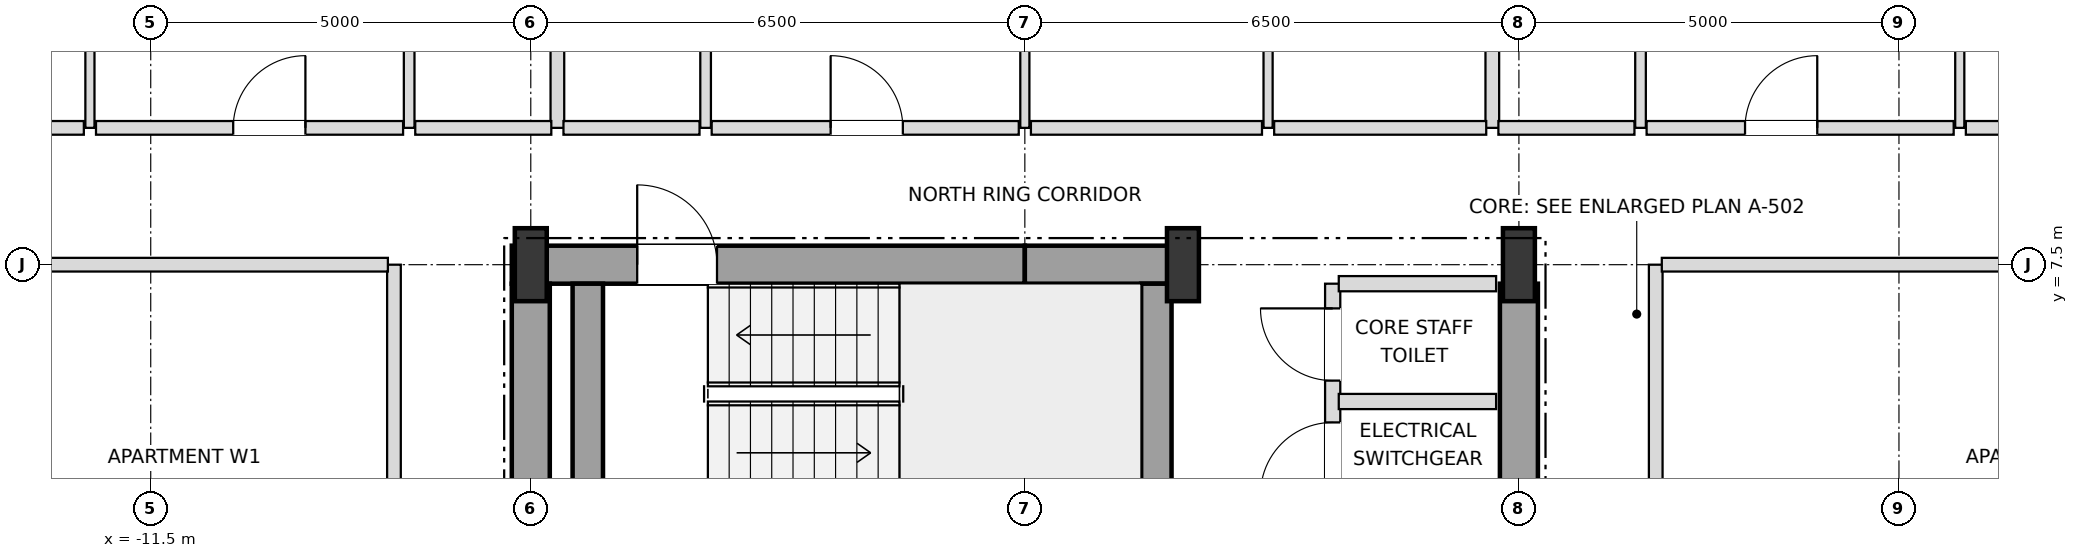
"""IFC4 building model, lengths in metres.
Left out: names, types, materials, properties, quantities, classifications, styles, units other than length and angle.
Written with IfcOpenShell. Run it as: python <this file> out.ifc"""

import sys

from ifc_helpers import new_model, si_unit, direction, frame, frame_2d, origin, origin_2d, place, context, subcontext, project, spatial, rectangle, i_section, extrude, element, fill, save


model = new_model("IFC4")
c1 = context("Model", 3, precision=1e-05, world=origin(), true_north=direction((0.0, 1.0)))
c2 = subcontext(c1, "Body", "Model", "MODEL_VIEW")
j1 = project(units=[si_unit("LENGTHUNIT", "METRE"), si_unit("PLANEANGLEUNIT", "RADIAN")], contexts=[c1])
p1 = place(None, origin())
s1 = spatial("IfcSite", under=j1, at=p1, CompositionType="ELEMENT")
p2 = place(p1, origin())
s2 = spatial("IfcBuilding", under=s1, at=p2, CompositionType="ELEMENT")
p3 = place(p2, frame((0.0, 0.0, 43.2)))
s3 = spatial("IfcBuildingStorey", under=s2, at=p3, CompositionType="ELEMENT", Elevation=43.2)
for number, where, z_axis, x_axis in (
    (1, (-6.5, 7.5, 0.0), (0.0, 0.0, 1.0), (1.0, 0.0, 0.0)),
    (2, (2.08, 7.5, 0.0), (0.0, 0.0, 1.0), (1.0, 0.0, 0.0)),
    (3, (6.5, 7.5, 0.0), (0.0, 0.0, 1.0), (1.0, 0.0, 0.0)),
):
    element("IfcColumn", number, at=place(p3, frame(where, z_axis=z_axis, x_axis=x_axis)), inside=s3, PredefinedType="COLUMN", context=c2, shape_type="SweptSolid", body=[
        extrude(i_section(OverallWidth=0.42, OverallDepth=0.96, WebThickness=0.022, FlangeThickness=0.034, at=origin_2d()), origin(), (0.0, 0.0, 1.0), 3.6),
    ])
p4 = place(p3, frame((-6.75, 7.5, 0.0), z_axis=(0.0, 0.0, 1.0), x_axis=(1.0, 0.0, 0.0)))
e4 = element("IfcWall", 4, at=p4, inside=s3, PredefinedType="SHEAR", context=c2, shape_type="SweptSolid", body=[
    extrude(rectangle(XDim=6.75, YDim=0.5, at=frame_2d((3.375, 0.0))), origin(), (0.0, 0.0, 1.0), 3.38),
])
p5 = place(p4, frame((1.65, 0.0, 0.0)))
e5 = element("IfcOpeningElement", 5, at=p5, cuts=e4, PredefinedType="OPENING", context=c2, shape_type="SweptSolid", body=[
    extrude(rectangle(XDim=1.05, YDim=2.15, at=frame_2d((0.525, 1.075))), frame((0.0, 0.26, 0.0), z_axis=(0.0, -1.0, 0.0), x_axis=(1.0, 0.0, 0.0)), (0.0, 0.0, 1.0), 0.52),
])
p6 = place(p3, frame((0.0, 7.5, 0.0), z_axis=(0.0, 0.0, 1.0), x_axis=(1.0, 0.0, 0.0)))
e6 = element("IfcWall", 6, at=p6, inside=s3, PredefinedType="SHEAR", context=c2, shape_type="SweptSolid", body=[
    extrude(rectangle(XDim=2.08, YDim=0.5, at=frame_2d((1.04, 0.0))), origin(), (0.0, 0.0, 1.0), 3.38),
])
for number, where, z_axis, x_axis in (
    (7, (-6.5, 3.95, 0.0), (0.0, 0.0, 1.0), (0.0, 1.0, 0.0)),
    (8, (6.5, 3.95, 0.0), (0.0, 0.0, 1.0), (0.0, 1.0, 0.0)),
):
    element("IfcWall", number, at=place(p3, frame(where, z_axis=z_axis, x_axis=x_axis)), inside=s3, PredefinedType="SHEAR", context=c2, shape_type="SweptSolid", body=[
        extrude(rectangle(XDim=3.3, YDim=0.5, at=frame_2d((1.65, 0.0))), origin(), (0.0, 0.0, 1.0), 3.38),
    ])
for number, where, z_axis, x_axis in (
    (9, (1.73, 3.95, 0.0), (0.0, 0.0, 1.0), (0.0, 1.0, 0.0)),
    (10, (-5.75, 3.95, 0.0), (0.0, 0.0, 1.0), (0.0, 1.0, 0.0)),
):
    element("IfcWall", number, at=place(p3, frame(where, z_axis=z_axis, x_axis=x_axis)), inside=s3, PredefinedType="SHEAR", context=c2, shape_type="SweptSolid", body=[
        extrude(rectangle(XDim=3.3, YDim=0.4, at=frame_2d((1.65, 0.0))), origin(), (0.0, 0.0, 1.0), 3.38),
    ])
p7 = place(p3, frame((-12.3, 9.3, 0.0), z_axis=(0.0, 0.0, 1.0), x_axis=(0.0, 1.0, 0.0)))
e11 = element("IfcWall", 11, at=p7, inside=s3, PredefinedType="PARTITIONING", context=c2, shape_type="SweptSolid", body=[
    extrude(rectangle(XDim=15.6, YDim=0.12, at=frame_2d((7.8, 0.0))), origin(), (0.0, 0.0, 1.0), 2.736),
])
p8 = place(p7, frame((4.325, 0.0, 0.0)))
e12 = element("IfcOpeningElement", 12, at=p8, cuts=e11, PredefinedType="OPENING", context=c2, shape_type="SweptSolid", body=[
    extrude(rectangle(XDim=0.95, YDim=2.1, at=frame_2d((0.475, 1.05))), frame((0.0, 0.07, 0.0), z_axis=(0.0, -1.0, 0.0), x_axis=(1.0, 0.0, 0.0)), (0.0, 0.0, 1.0), 0.14),
])
p9 = place(p7, frame((12.15, 0.0, 0.0)))
e13 = element("IfcOpeningElement", 13, at=p9, cuts=e11, PredefinedType="OPENING", context=c2, shape_type="SweptSolid", body=[
    extrude(rectangle(XDim=0.9, YDim=2.1, at=frame_2d((0.45, 1.05))), frame((0.0, 0.07, 0.0), z_axis=(0.0, -1.0, 0.0), x_axis=(1.0, 0.0, 0.0)), (0.0, 0.0, 1.0), 0.14),
])
p10 = place(p3, frame((-8.3, -7.5, 0.0), z_axis=(0.0, 0.0, 1.0), x_axis=(0.0, 1.0, 0.0)))
e14 = element("IfcWall", 14, at=p10, inside=s3, PredefinedType="PARTITIONING", context=c2, shape_type="SweptSolid", body=[
    extrude(rectangle(XDim=15.0, YDim=0.18, at=frame_2d((7.5, 0.0))), origin(), (0.0, 0.0, 1.0), 3.38),
])
p11 = place(p10, frame((3.475, 0.0, 0.0)))
e15 = element("IfcOpeningElement", 15, at=p11, cuts=e14, PredefinedType="OPENING", context=c2, shape_type="SweptSolid", body=[
    extrude(rectangle(XDim=0.95, YDim=2.15, at=frame_2d((0.475, 1.075))), frame((0.0, 0.1, 0.0), z_axis=(0.0, -1.0, 0.0), x_axis=(1.0, 0.0, 0.0)), (0.0, 0.0, 1.0), 0.2),
])
p12 = place(p3, frame((-8.1, 9.3, 0.0), z_axis=(0.0, 0.0, 1.0), x_axis=(0.0, 1.0, 0.0)))
e16 = element("IfcWall", 16, at=p12, inside=s3, PredefinedType="PARTITIONING", context=c2, shape_type="SweptSolid", body=[
    extrude(rectangle(XDim=9.6, YDim=0.14, at=frame_2d((4.8, 0.0))), origin(), (0.0, 0.0, 1.0), 2.816),
])
p13 = place(p12, frame((4.35, 0.0, 0.0)))
e17 = element("IfcOpeningElement", 17, at=p13, cuts=e16, PredefinedType="OPENING", context=c2, shape_type="SweptSolid", body=[
    extrude(rectangle(XDim=0.9, YDim=2.1, at=frame_2d((0.45, 1.05))), frame((0.0, 0.08, 0.0), z_axis=(0.0, -1.0, 0.0), x_axis=(1.0, 0.0, 0.0)), (0.0, 0.0, 1.0), 0.16),
])
p14 = place(p3, frame((-6.15, 9.3, 0.0), z_axis=(0.0, 0.0, 1.0), x_axis=(0.0, 1.0, 0.0)))
e18 = element("IfcWall", 18, at=p14, inside=s3, PredefinedType="PARTITIONING", context=c2, shape_type="SweptSolid", body=[
    extrude(rectangle(XDim=15.6, YDim=0.18, at=frame_2d((7.8, 0.0))), origin(), (0.0, 0.0, 1.0), 2.816),
])
p15 = place(p3, frame((-4.2, 9.3, 0.0), z_axis=(0.0, 0.0, 1.0), x_axis=(0.0, 1.0, 0.0)))
e19 = element("IfcWall", 19, at=p15, inside=s3, PredefinedType="PARTITIONING", context=c2, shape_type="SweptSolid", body=[
    extrude(rectangle(XDim=9.6, YDim=0.14, at=frame_2d((4.8, 0.0))), origin(), (0.0, 0.0, 1.0), 2.948),
])
p16 = place(p15, frame((4.35, 0.0, 0.0)))
e20 = element("IfcOpeningElement", 20, at=p16, cuts=e19, PredefinedType="OPENING", context=c2, shape_type="SweptSolid", body=[
    extrude(rectangle(XDim=0.9, YDim=2.1, at=frame_2d((0.45, 1.05))), frame((0.0, 0.08, 0.0), z_axis=(0.0, -1.0, 0.0), x_axis=(1.0, 0.0, 0.0)), (0.0, 0.0, 1.0), 0.16),
])
p17 = place(p3, frame((0.0, 9.3, 0.0), z_axis=(0.0, 0.0, 1.0), x_axis=(0.0, 1.0, 0.0)))
e21 = element("IfcWall", 21, at=p17, inside=s3, PredefinedType="PARTITIONING", context=c2, shape_type="SweptSolid", body=[
    extrude(rectangle(XDim=15.6, YDim=0.12, at=frame_2d((7.8, 0.0))), origin(), (0.0, 0.0, 1.0), 2.816),
])
p18 = place(p17, frame((4.325, 0.0, 0.0)))
e22 = element("IfcOpeningElement", 22, at=p18, cuts=e21, PredefinedType="OPENING", context=c2, shape_type="SweptSolid", body=[
    extrude(rectangle(XDim=0.95, YDim=2.1, at=frame_2d((0.475, 1.05))), frame((0.0, 0.07, 0.0), z_axis=(0.0, -1.0, 0.0), x_axis=(1.0, 0.0, 0.0)), (0.0, 0.0, 1.0), 0.14),
])
p19 = place(p17, frame((12.15, 0.0, 0.0)))
e23 = element("IfcOpeningElement", 23, at=p19, cuts=e21, PredefinedType="OPENING", context=c2, shape_type="SweptSolid", body=[
    extrude(rectangle(XDim=0.9, YDim=2.1, at=frame_2d((0.45, 1.05))), frame((0.0, 0.07, 0.0), z_axis=(0.0, -1.0, 0.0), x_axis=(1.0, 0.0, 0.0)), (0.0, 0.0, 1.0), 0.14),
])
p20 = place(p3, frame((3.2, 9.3, 0.0), z_axis=(0.0, 0.0, 1.0), x_axis=(0.0, 1.0, 0.0)))
e24 = element("IfcWall", 24, at=p20, inside=s3, PredefinedType="PARTITIONING", context=c2, shape_type="SweptSolid", body=[
    extrude(rectangle(XDim=15.6, YDim=0.12, at=frame_2d((7.8, 0.0))), origin(), (0.0, 0.0, 1.0), 2.816),
])
p21 = place(p20, frame((4.35, 0.0, 0.0)))
e25 = element("IfcOpeningElement", 25, at=p21, cuts=e24, PredefinedType="OPENING", context=c2, shape_type="SweptSolid", body=[
    extrude(rectangle(XDim=0.9, YDim=2.1, at=frame_2d((0.45, 1.05))), frame((0.0, 0.07, 0.0), z_axis=(0.0, -1.0, 0.0), x_axis=(1.0, 0.0, 0.0)), (0.0, 0.0, 1.0), 0.14),
])
p22 = place(p20, frame((12.15, 0.0, 0.0)))
e26 = element("IfcOpeningElement", 26, at=p22, cuts=e24, PredefinedType="OPENING", context=c2, shape_type="SweptSolid", body=[
    extrude(rectangle(XDim=0.9, YDim=2.1, at=frame_2d((0.45, 1.05))), frame((0.0, 0.07, 0.0), z_axis=(0.0, -1.0, 0.0), x_axis=(1.0, 0.0, 0.0)), (0.0, 0.0, 1.0), 0.14),
])
p23 = place(p3, frame((4.05, 4.2, 0.0), z_axis=(0.0, 0.0, 1.0), x_axis=(0.0, 1.0, 0.0)))
e27 = element("IfcWall", 27, at=p23, inside=s3, PredefinedType="SOLIDWALL", context=c2, shape_type="SweptSolid", body=[
    extrude(rectangle(XDim=3.05, YDim=0.2, at=frame_2d((1.525, 0.0))), origin(), (0.0, 0.0, 1.0), 3.38),
])
p24 = place(p23, frame((0.275, 0.0, 0.0)))
e28 = element("IfcOpeningElement", 28, at=p24, cuts=e27, PredefinedType="OPENING", context=c2, shape_type="SweptSolid", body=[
    extrude(rectangle(XDim=0.95, YDim=2.15, at=frame_2d((0.475, 1.075))), frame((0.0, 0.11, 0.0), z_axis=(0.0, -1.0, 0.0), x_axis=(1.0, 0.0, 0.0)), (0.0, 0.0, 1.0), 0.22),
])
p25 = place(p23, frame((1.775, 0.0, 0.0)))
e29 = element("IfcOpeningElement", 29, at=p25, cuts=e27, PredefinedType="OPENING", context=c2, shape_type="SweptSolid", body=[
    extrude(rectangle(XDim=0.95, YDim=2.15, at=frame_2d((0.475, 1.075))), frame((0.0, 0.11, 0.0), z_axis=(0.0, -1.0, 0.0), x_axis=(1.0, 0.0, 0.0)), (0.0, 0.0, 1.0), 0.22),
])
p26 = place(p3, frame((6.15, 9.3, 0.0), z_axis=(0.0, 0.0, 1.0), x_axis=(0.0, 1.0, 0.0)))
e30 = element("IfcWall", 30, at=p26, inside=s3, PredefinedType="PARTITIONING", context=c2, shape_type="SweptSolid", body=[
    extrude(rectangle(XDim=15.6, YDim=0.18, at=frame_2d((7.8, 0.0))), origin(), (0.0, 0.0, 1.0), 2.816),
])
p27 = place(p3, frame((8.1, 9.3, 0.0), z_axis=(0.0, 0.0, 1.0), x_axis=(0.0, 1.0, 0.0)))
e31 = element("IfcWall", 31, at=p27, inside=s3, PredefinedType="PARTITIONING", context=c2, shape_type="SweptSolid", body=[
    extrude(rectangle(XDim=9.6, YDim=0.14, at=frame_2d((4.8, 0.0))), origin(), (0.0, 0.0, 1.0), 2.816),
])
p28 = place(p27, frame((4.35, 0.0, 0.0)))
e32 = element("IfcOpeningElement", 32, at=p28, cuts=e31, PredefinedType="OPENING", context=c2, shape_type="SweptSolid", body=[
    extrude(rectangle(XDim=0.9, YDim=2.1, at=frame_2d((0.45, 1.05))), frame((0.0, 0.08, 0.0), z_axis=(0.0, -1.0, 0.0), x_axis=(1.0, 0.0, 0.0)), (0.0, 0.0, 1.0), 0.16),
])
p29 = place(p3, frame((8.3, -7.5, 0.0), z_axis=(0.0, 0.0, 1.0), x_axis=(0.0, 1.0, 0.0)))
e33 = element("IfcWall", 33, at=p29, inside=s3, PredefinedType="PARTITIONING", context=c2, shape_type="SweptSolid", body=[
    extrude(rectangle(XDim=15.0, YDim=0.18, at=frame_2d((7.5, 0.0))), origin(), (0.0, 0.0, 1.0), 3.38),
])
p30 = place(p29, frame((3.475, 0.0, 0.0)))
e34 = element("IfcOpeningElement", 34, at=p30, cuts=e33, PredefinedType="OPENING", context=c2, shape_type="SweptSolid", body=[
    extrude(rectangle(XDim=0.95, YDim=2.15, at=frame_2d((0.475, 1.075))), frame((0.0, 0.1, 0.0), z_axis=(0.0, -1.0, 0.0), x_axis=(1.0, 0.0, 0.0)), (0.0, 0.0, 1.0), 0.2),
])
p31 = place(p3, frame((12.3, 9.3, 0.0), z_axis=(0.0, 0.0, 1.0), x_axis=(0.0, 1.0, 0.0)))
e35 = element("IfcWall", 35, at=p31, inside=s3, PredefinedType="PARTITIONING", context=c2, shape_type="SweptSolid", body=[
    extrude(rectangle(XDim=15.6, YDim=0.12, at=frame_2d((7.8, 0.0))), origin(), (0.0, 0.0, 1.0), 2.736),
])
p32 = place(p31, frame((4.325, 0.0, 0.0)))
e36 = element("IfcOpeningElement", 36, at=p32, cuts=e35, PredefinedType="OPENING", context=c2, shape_type="SweptSolid", body=[
    extrude(rectangle(XDim=0.95, YDim=2.1, at=frame_2d((0.475, 1.05))), frame((0.0, 0.07, 0.0), z_axis=(0.0, -1.0, 0.0), x_axis=(1.0, 0.0, 0.0)), (0.0, 0.0, 1.0), 0.14),
])
p33 = place(p31, frame((12.15, 0.0, 0.0)))
e37 = element("IfcOpeningElement", 37, at=p33, cuts=e35, PredefinedType="OPENING", context=c2, shape_type="SweptSolid", body=[
    extrude(rectangle(XDim=0.9, YDim=2.1, at=frame_2d((0.45, 1.05))), frame((0.0, 0.07, 0.0), z_axis=(0.0, -1.0, 0.0), x_axis=(1.0, 0.0, 0.0)), (0.0, 0.0, 1.0), 0.14),
])
for number, where, z_axis, x_axis in (
    (38, (4.13, 5.7, 0.0), (0.0, 0.0, 1.0), (1.0, 0.0, 0.0)),
    (39, (4.13, 7.25, 0.0), (0.0, 0.0, 1.0), (1.0, 0.0, 0.0)),
):
    element("IfcWall", number, at=place(p3, frame(where, z_axis=z_axis, x_axis=x_axis)), inside=s3, PredefinedType="SOLIDWALL", context=c2, shape_type="SweptSolid", body=[
        extrude(rectangle(XDim=2.07, YDim=0.2, at=frame_2d((1.035, 0.0))), origin(), (0.0, 0.0, 1.0), 3.38),
    ])
for number, where, z_axis, x_axis in (
    (40, (-16.02, 7.5, 0.0), (0.0, 0.0, 1.0), (1.0, 0.0, 0.0)),
    (41, (8.38, 7.5, 0.0), (0.0, 0.0, 1.0), (1.0, 0.0, 0.0)),
):
    element("IfcWall", number, at=place(p3, frame(where, z_axis=z_axis, x_axis=x_axis)), inside=s3, PredefinedType="PARTITIONING", context=c2, shape_type="SweptSolid", body=[
        extrude(rectangle(XDim=7.64, YDim=0.18, at=frame_2d((3.82, 0.0))), origin(), (0.0, 0.0, 1.0), 2.816),
    ])
p34 = place(p3, frame((-15.37, 9.3, 0.0), z_axis=(0.0, 0.0, 1.0), x_axis=(1.0, 0.0, 0.0)))
e42 = element("IfcWall", 42, at=p34, inside=s3, PredefinedType="PARTITIONING", context=c2, shape_type="SweptSolid", body=[
    extrude(rectangle(XDim=2.99, YDim=0.18, at=frame_2d((1.495, 0.0))), origin(), (0.0, 0.0, 1.0), 3.38),
])
p35 = place(p3, frame((-12.22, 9.3, 0.0), z_axis=(0.0, 0.0, 1.0), x_axis=(1.0, 0.0, 0.0)))
e43 = element("IfcWall", 43, at=p35, inside=s3, PredefinedType="PARTITIONING", context=c2, shape_type="SweptSolid", body=[
    extrude(rectangle(XDim=4.04, YDim=0.18, at=frame_2d((2.02, 0.0))), origin(), (0.0, 0.0, 1.0), 3.38),
])
p36 = place(p35, frame((1.805, 0.0, 0.0)))
e44 = element("IfcOpeningElement", 44, at=p36, cuts=e43, PredefinedType="OPENING", context=c2, shape_type="SweptSolid", body=[
    extrude(rectangle(XDim=0.95, YDim=2.15, at=frame_2d((0.475, 1.075))), frame((0.0, 0.1, 0.0), z_axis=(0.0, -1.0, 0.0), x_axis=(1.0, 0.0, 0.0)), (0.0, 0.0, 1.0), 0.2),
])
p37 = place(p3, frame((-8.02, 9.3, 0.0), z_axis=(0.0, 0.0, 1.0), x_axis=(1.0, 0.0, 0.0)))
e45 = element("IfcWall", 45, at=p37, inside=s3, PredefinedType="PARTITIONING", context=c2, shape_type="SweptSolid", body=[
    extrude(rectangle(XDim=1.79, YDim=0.18, at=frame_2d((0.895, 0.0))), origin(), (0.0, 0.0, 1.0), 2.816),
])
p38 = place(p3, frame((-6.07, 9.3, 0.0), z_axis=(0.0, 0.0, 1.0), x_axis=(1.0, 0.0, 0.0)))
e46 = element("IfcWall", 46, at=p38, inside=s3, PredefinedType="PARTITIONING", context=c2, shape_type="SweptSolid", body=[
    extrude(rectangle(XDim=1.79, YDim=0.18, at=frame_2d((0.895, 0.0))), origin(), (0.0, 0.0, 1.0), 3.38),
])
p39 = place(p3, frame((-4.12, 9.3, 0.0), z_axis=(0.0, 0.0, 1.0), x_axis=(1.0, 0.0, 0.0)))
e47 = element("IfcWall", 47, at=p39, inside=s3, PredefinedType="PARTITIONING", context=c2, shape_type="SweptSolid", body=[
    extrude(rectangle(XDim=4.04, YDim=0.18, at=frame_2d((2.02, 0.0))), origin(), (0.0, 0.0, 1.0), 3.38),
])
p40 = place(p39, frame((1.565, 0.0, 0.0)))
e48 = element("IfcOpeningElement", 48, at=p40, cuts=e47, PredefinedType="OPENING", context=c2, shape_type="SweptSolid", body=[
    extrude(rectangle(XDim=0.95, YDim=2.15, at=frame_2d((0.475, 1.075))), frame((0.0, 0.1, 0.0), z_axis=(0.0, -1.0, 0.0), x_axis=(1.0, 0.0, 0.0)), (0.0, 0.0, 1.0), 0.2),
])
p41 = place(p3, frame((0.08, 9.3, 0.0), z_axis=(0.0, 0.0, 1.0), x_axis=(1.0, 0.0, 0.0)))
e49 = element("IfcWall", 49, at=p41, inside=s3, PredefinedType="PARTITIONING", context=c2, shape_type="SweptSolid", body=[
    extrude(rectangle(XDim=3.04, YDim=0.18, at=frame_2d((1.52, 0.0))), origin(), (0.0, 0.0, 1.0), 3.38),
])
p42 = place(p3, frame((3.28, 9.3, 0.0), z_axis=(0.0, 0.0, 1.0), x_axis=(1.0, 0.0, 0.0)))
e50 = element("IfcWall", 50, at=p42, inside=s3, PredefinedType="PARTITIONING", context=c2, shape_type="SweptSolid", body=[
    extrude(rectangle(XDim=2.79, YDim=0.18, at=frame_2d((1.395, 0.0))), origin(), (0.0, 0.0, 1.0), 3.38),
])
p43 = place(p3, frame((6.23, 9.3, 0.0), z_axis=(0.0, 0.0, 1.0), x_axis=(1.0, 0.0, 0.0)))
e51 = element("IfcWall", 51, at=p43, inside=s3, PredefinedType="PARTITIONING", context=c2, shape_type="SweptSolid", body=[
    extrude(rectangle(XDim=1.79, YDim=0.18, at=frame_2d((0.895, 0.0))), origin(), (0.0, 0.0, 1.0), 2.816),
])
p44 = place(p3, frame((8.18, 9.3, 0.0), z_axis=(0.0, 0.0, 1.0), x_axis=(1.0, 0.0, 0.0)))
e52 = element("IfcWall", 52, at=p44, inside=s3, PredefinedType="PARTITIONING", context=c2, shape_type="SweptSolid", body=[
    extrude(rectangle(XDim=4.04, YDim=0.18, at=frame_2d((2.02, 0.0))), origin(), (0.0, 0.0, 1.0), 3.38),
])
p45 = place(p44, frame((1.295, 0.0, 0.0)))
e53 = element("IfcOpeningElement", 53, at=p45, cuts=e52, PredefinedType="OPENING", context=c2, shape_type="SweptSolid", body=[
    extrude(rectangle(XDim=0.95, YDim=2.15, at=frame_2d((0.475, 1.075))), frame((0.0, 0.1, 0.0), z_axis=(0.0, -1.0, 0.0), x_axis=(1.0, 0.0, 0.0)), (0.0, 0.0, 1.0), 0.2),
])
p46 = place(p3, frame((12.38, 9.3, 0.0), z_axis=(0.0, 0.0, 1.0), x_axis=(1.0, 0.0, 0.0)))
e54 = element("IfcWall", 54, at=p46, inside=s3, PredefinedType="PARTITIONING", context=c2, shape_type="SweptSolid", body=[
    extrude(rectangle(XDim=3.04, YDim=0.18, at=frame_2d((1.52, 0.0))), origin(), (0.0, 0.0, 1.0), 3.38),
])
p47 = place(p5, origin())
e55 = element("IfcDoor", 55, at=p47, inside=s3, OperationType="SINGLE_SWING_LEFT", PredefinedType="DOOR", context=c2, shape_type="SweptSolid", body=[
    extrude(rectangle(XDim=1.05, YDim=2.15, at=frame_2d((0.525, 1.075))), frame((0.0, 0.025, 0.0), z_axis=(0.0, -1.0, 0.0), x_axis=(1.0, 0.0, 0.0)), (0.0, 0.0, 1.0), 0.05),
])
fill(e5, e55)
p48 = place(p24, origin())
e56 = element("IfcDoor", 56, at=p48, inside=s3, OperationType="SINGLE_SWING_LEFT", PredefinedType="DOOR", context=c2, shape_type="SweptSolid", body=[
    extrude(rectangle(XDim=0.95, YDim=2.15, at=frame_2d((0.475, 1.075))), frame((0.0, 0.025, 0.0), z_axis=(0.0, -1.0, 0.0), x_axis=(1.0, 0.0, 0.0)), (0.0, 0.0, 1.0), 0.05),
])
fill(e28, e56)
p49 = place(p25, origin())
e57 = element("IfcDoor", 57, at=p49, inside=s3, OperationType="SINGLE_SWING_RIGHT", PredefinedType="DOOR", context=c2, shape_type="SweptSolid", body=[
    extrude(rectangle(XDim=0.95, YDim=2.15, at=frame_2d((0.475, 1.075))), frame((0.0, 0.025, 0.0), z_axis=(0.0, -1.0, 0.0), x_axis=(1.0, 0.0, 0.0)), (0.0, 0.0, 1.0), 0.05),
])
fill(e29, e57)
p50 = place(p36, origin())
e58 = element("IfcDoor", 58, at=p50, inside=s3, OperationType="SINGLE_SWING_RIGHT", PredefinedType="DOOR", context=c2, shape_type="SweptSolid", body=[
    extrude(rectangle(XDim=0.95, YDim=2.15, at=frame_2d((0.475, 1.075))), frame((0.0, 0.025, 0.0), z_axis=(0.0, -1.0, 0.0), x_axis=(1.0, 0.0, 0.0)), (0.0, 0.0, 1.0), 0.05),
])
fill(e44, e58)
p51 = place(p40, origin())
e59 = element("IfcDoor", 59, at=p51, inside=s3, OperationType="SINGLE_SWING_LEFT", PredefinedType="DOOR", context=c2, shape_type="SweptSolid", body=[
    extrude(rectangle(XDim=0.95, YDim=2.15, at=frame_2d((0.475, 1.075))), frame((0.0, 0.025, 0.0), z_axis=(0.0, -1.0, 0.0), x_axis=(1.0, 0.0, 0.0)), (0.0, 0.0, 1.0), 0.05),
])
fill(e48, e59)
p52 = place(p45, origin())
e60 = element("IfcDoor", 60, at=p52, inside=s3, OperationType="SINGLE_SWING_RIGHT", PredefinedType="DOOR", context=c2, shape_type="SweptSolid", body=[
    extrude(rectangle(XDim=0.95, YDim=2.15, at=frame_2d((0.475, 1.075))), frame((0.0, 0.025, 0.0), z_axis=(0.0, -1.0, 0.0), x_axis=(1.0, 0.0, 0.0)), (0.0, 0.0, 1.0), 0.05),
])
fill(e53, e60)
save(model, sys.argv[1])
